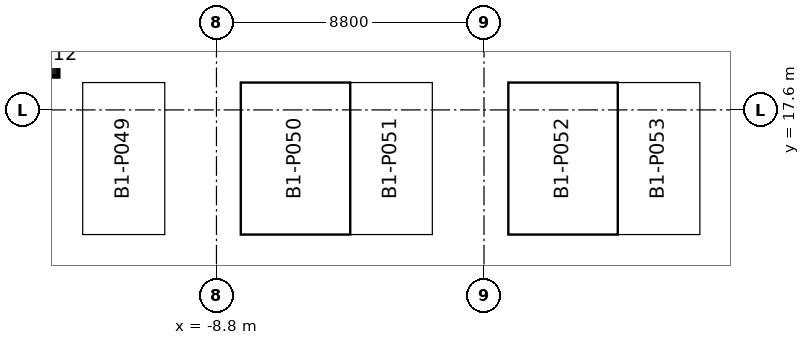
"""IFC4 building model, lengths in metres.
Left out: names, types, materials, properties, quantities, classifications, styles, units other than length and angle.
Written with IfcOpenShell. Run it as: python <this file> out.ifc"""

import sys

from ifc_helpers import new_model, si_unit, direction, frame, origin, origin_2d, place, context, subcontext, project, spatial, rectangle, extrude, element, save


model = new_model("IFC4")
c1 = context("Model", 3, precision=1e-05, world=origin(), true_north=direction((0.0, 1.0)))
c2 = subcontext(c1, "Body", "Model", "MODEL_VIEW")
j1 = project(units=[si_unit("LENGTHUNIT", "METRE"), si_unit("PLANEANGLEUNIT", "RADIAN")], contexts=[c1])
p1 = place(None, origin())
s1 = spatial("IfcSite", under=j1, at=p1, CompositionType="ELEMENT")
p2 = place(p1, origin())
s2 = spatial("IfcBuilding", under=s1, at=p2, CompositionType="ELEMENT")
p3 = place(p2, frame((0.0, 0.0, -4.5)))
s3 = spatial("IfcBuildingStorey", under=s2, at=p3, CompositionType="ELEMENT", Elevation=-4.5)
p4 = place(p3, frame((-14.708, 19.404, 0.0), z_axis=(0.0, 0.0, 1.0), x_axis=(0.555816910562, 0.8313047347, 0.0)))
e1 = element("IfcColumn", 1, at=p4, inside=s3, PredefinedType="COLUMN", context=c2, shape_type="SweptSolid", body=[
    extrude(rectangle(XDim=1.4, YDim=1.4, at=origin_2d()), origin(), (0.0, 0.0, 1.0), 4.5),
])
save(model, sys.argv[1])
